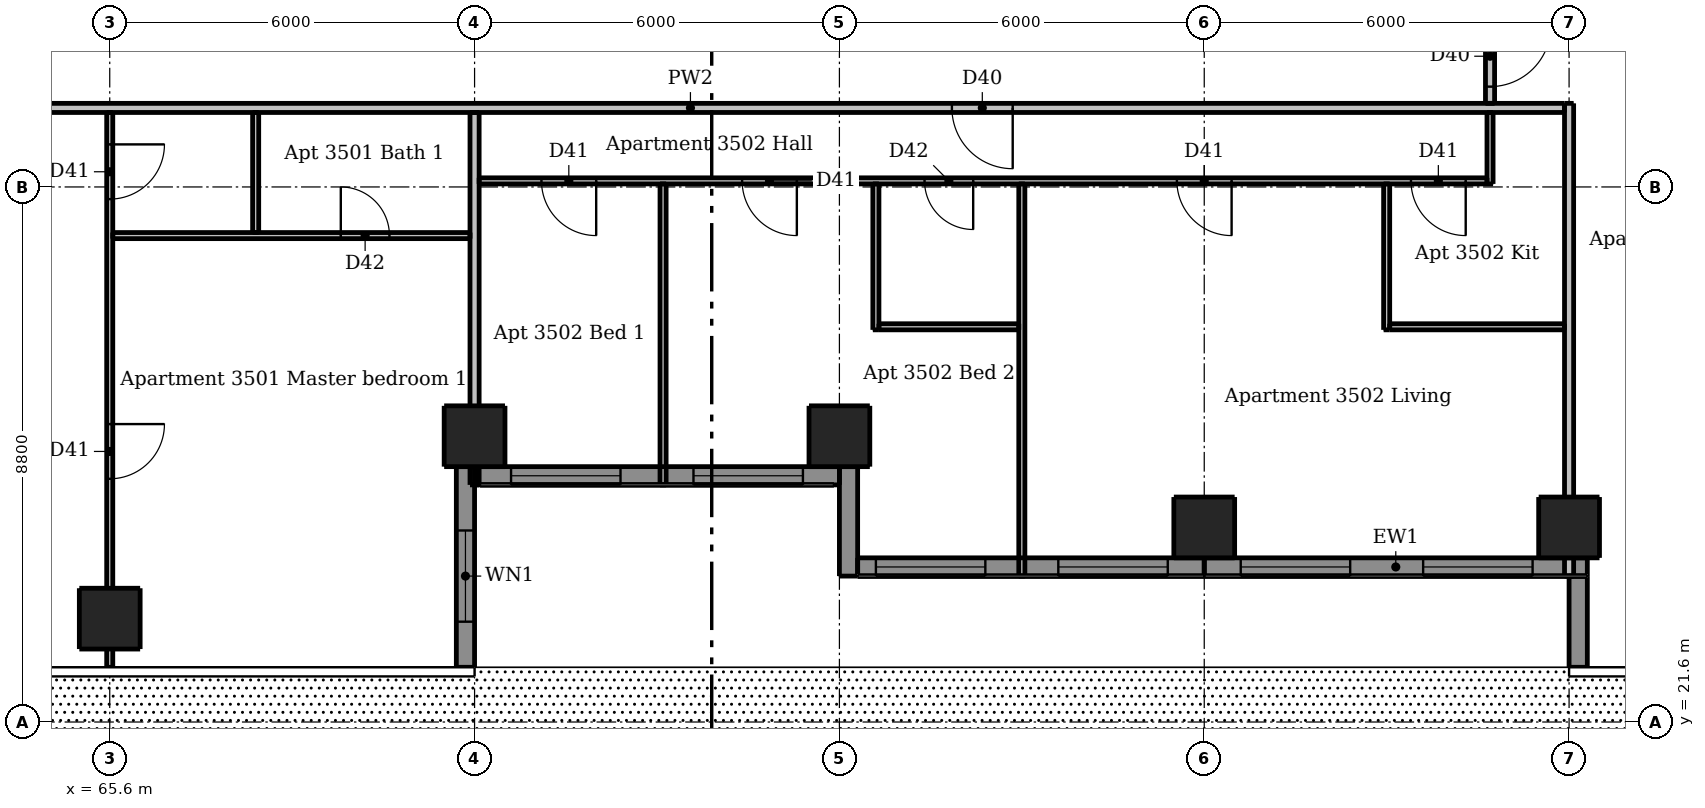
"""IFC4 building model, lengths in metres.
Left out: names, types, materials, properties, quantities, classifications, styles, units other than length and angle.
Written with IfcOpenShell. Run it as: python <this file> out.ifc"""

import sys

from ifc_helpers import new_model, si_unit, direction, frame, frame_2d, origin, origin_2d, place, context, subcontext, project, spatial, rectangle, extrude, element, fill, save


model = new_model("IFC4")
c1 = context("Model", 3, precision=1e-05, world=origin(), true_north=direction((0.0, 1.0)))
c2 = subcontext(c1, "Body", "Model", "MODEL_VIEW")
j1 = project(units=[si_unit("LENGTHUNIT", "METRE"), si_unit("PLANEANGLEUNIT", "RADIAN")], contexts=[c1])
p1 = place(None, origin())
s1 = spatial("IfcSite", under=j1, at=p1, CompositionType="ELEMENT")
p2 = place(p1, origin())
s2 = spatial("IfcBuilding", under=s1, at=p2, CompositionType="ELEMENT")
p3 = place(p2, frame((0.0, 0.0, 133.9)))
s3 = spatial("IfcBuildingStorey", under=s2, at=p3, CompositionType="ELEMENT", Elevation=133.9)
for number, where, z_axis, x_axis in (
    (1, (65.6, 23.3, 0.0), (0.0, 0.0, 1.0), (1.0, 0.0, 0.0)),
    (2, (71.6, 26.3, 0.0), (0.0, 0.0, 1.0), (1.0, 0.0, 0.0)),
    (3, (77.6, 26.3, 0.0), (0.0, 0.0, 1.0), (1.0, 0.0, 0.0)),
    (4, (83.6, 24.8, 0.0), (0.0, 0.0, 1.0), (1.0, 0.0, 0.0)),
    (5, (89.6, 24.8, 0.0), (0.0, 0.0, 1.0), (1.0, 0.0, 0.0)),
):
    element("IfcColumn", number, at=place(p3, frame(where, z_axis=z_axis, x_axis=x_axis)), inside=s3, PredefinedType="COLUMN", context=c2, shape_type="SweptSolid", body=[
        extrude(rectangle(XDim=1.0, YDim=1.0, at=origin_2d()), origin(), (0.0, 0.0, 1.0), 3.05),
    ])
p4 = place(p3, frame((71.45, 22.5, 0.0), z_axis=(0.0, 0.0, 1.0), x_axis=(0.0, 1.0, 0.0)))
e6 = element("IfcWall", 6, at=p4, inside=s3, PredefinedType="SOLIDWALL", context=c2, shape_type="SweptSolid", body=[
    extrude(rectangle(XDim=3.3, YDim=0.3, at=frame_2d((1.65, 0.0))), origin(), (0.0, 0.0, 1.0), 3.05),
])
p5 = place(p4, frame((0.75, 0.0, 0.9)))
e7 = element("IfcOpeningElement", 7, at=p5, cuts=e6, PredefinedType="OPENING", context=c2, shape_type="SweptSolid", body=[
    extrude(rectangle(XDim=1.5, YDim=1.5, at=frame_2d((0.75, 0.75))), frame((0.0, 0.16, 0.0), z_axis=(0.0, -1.0, 0.0), x_axis=(1.0, 0.0, 0.0)), (0.0, 0.0, 1.0), 0.32),
])
p6 = place(p3, frame((77.75, 25.8, 0.0), z_axis=(0.0, 0.0, 1.0), x_axis=(0.0, -1.0, 0.0)))
e8 = element("IfcWall", 8, at=p6, inside=s3, PredefinedType="SOLIDWALL", context=c2, shape_type="SweptSolid", body=[
    extrude(rectangle(XDim=1.8, YDim=0.3, at=frame_2d((0.9, 0.0))), origin(), (0.0, 0.0, 1.0), 3.05),
])
p7 = place(p3, frame((89.75, 24.0, 0.0), z_axis=(0.0, 0.0, 1.0), x_axis=(0.0, -1.0, 0.0)))
e9 = element("IfcWall", 9, at=p7, inside=s3, PredefinedType="SOLIDWALL", context=c2, shape_type="SweptSolid", body=[
    extrude(rectangle(XDim=1.5, YDim=0.3, at=frame_2d((0.75, 0.0))), origin(), (0.0, 0.0, 1.0), 3.05),
])
p8 = place(p3, frame((71.6, 25.65, 0.0), z_axis=(0.0, 0.0, 1.0), x_axis=(1.0, 0.0, 0.0)))
e10 = element("IfcWall", 10, at=p8, inside=s3, PredefinedType="SOLIDWALL", context=c2, shape_type="SweptSolid", body=[
    extrude(rectangle(XDim=6.0, YDim=0.3, at=frame_2d((3.0, 0.0))), origin(), (0.0, 0.0, 1.0), 3.05),
])
p9 = place(p8, frame((0.6, 0.0, 0.15)))
e11 = element("IfcOpeningElement", 11, at=p9, cuts=e10, PredefinedType="OPENING", context=c2, shape_type="SweptSolid", body=[
    extrude(rectangle(XDim=1.8, YDim=2.1, at=frame_2d((0.9, 1.05))), frame((0.0, 0.16, 0.0), z_axis=(0.0, -1.0, 0.0), x_axis=(1.0, 0.0, 0.0)), (0.0, 0.0, 1.0), 0.32),
])
p10 = place(p8, frame((3.6, 0.0, 0.15)))
e12 = element("IfcOpeningElement", 12, at=p10, cuts=e10, PredefinedType="OPENING", context=c2, shape_type="SweptSolid", body=[
    extrude(rectangle(XDim=1.8, YDim=2.1, at=frame_2d((0.9, 1.05))), frame((0.0, 0.16, 0.0), z_axis=(0.0, -1.0, 0.0), x_axis=(1.0, 0.0, 0.0)), (0.0, 0.0, 1.0), 0.32),
])
p11 = place(p3, frame((77.9, 24.15, 0.0), z_axis=(0.0, 0.0, 1.0), x_axis=(1.0, 0.0, 0.0)))
e13 = element("IfcWall", 13, at=p11, inside=s3, PredefinedType="SOLIDWALL", context=c2, shape_type="SweptSolid", body=[
    extrude(rectangle(XDim=5.7, YDim=0.3, at=frame_2d((2.85, 0.0))), origin(), (0.0, 0.0, 1.0), 3.05),
])
p12 = place(p11, frame((0.3, 0.0, 0.15)))
e14 = element("IfcOpeningElement", 14, at=p12, cuts=e13, PredefinedType="OPENING", context=c2, shape_type="SweptSolid", body=[
    extrude(rectangle(XDim=1.8, YDim=2.1, at=frame_2d((0.9, 1.05))), frame((0.0, 0.16, 0.0), z_axis=(0.0, -1.0, 0.0), x_axis=(1.0, 0.0, 0.0)), (0.0, 0.0, 1.0), 0.32),
])
p13 = place(p11, frame((3.3, 0.0, 0.15)))
e15 = element("IfcOpeningElement", 15, at=p13, cuts=e13, PredefinedType="OPENING", context=c2, shape_type="SweptSolid", body=[
    extrude(rectangle(XDim=1.8, YDim=2.1, at=frame_2d((0.9, 1.05))), frame((0.0, 0.16, 0.0), z_axis=(0.0, -1.0, 0.0), x_axis=(1.0, 0.0, 0.0)), (0.0, 0.0, 1.0), 0.32),
])
p14 = place(p3, frame((83.6, 24.15, 0.0), z_axis=(0.0, 0.0, 1.0), x_axis=(1.0, 0.0, 0.0)))
e16 = element("IfcWall", 16, at=p14, inside=s3, PredefinedType="SOLIDWALL", context=c2, shape_type="SweptSolid", body=[
    extrude(rectangle(XDim=6.3, YDim=0.3, at=frame_2d((3.15, 0.0))), origin(), (0.0, 0.0, 1.0), 3.05),
])
p15 = place(p14, frame((0.6, 0.0, 0.15)))
e17 = element("IfcOpeningElement", 17, at=p15, cuts=e16, PredefinedType="OPENING", context=c2, shape_type="SweptSolid", body=[
    extrude(rectangle(XDim=1.8, YDim=2.1, at=frame_2d((0.9, 1.05))), frame((0.0, 0.16, 0.0), z_axis=(0.0, -1.0, 0.0), x_axis=(1.0, 0.0, 0.0)), (0.0, 0.0, 1.0), 0.32),
])
p16 = place(p14, frame((3.6, 0.0, 0.15)))
e18 = element("IfcOpeningElement", 18, at=p16, cuts=e16, PredefinedType="OPENING", context=c2, shape_type="SweptSolid", body=[
    extrude(rectangle(XDim=1.8, YDim=2.1, at=frame_2d((0.9, 1.05))), frame((0.0, 0.16, 0.0), z_axis=(0.0, -1.0, 0.0), x_axis=(1.0, 0.0, 0.0)), (0.0, 0.0, 1.0), 0.32),
])
p17 = place(p3, frame((65.6, 31.625, 0.0), z_axis=(0.0, 0.0, 1.0), x_axis=(0.0, -1.0, 0.0)))
e19 = element("IfcWall", 19, at=p17, inside=s3, PredefinedType="PARTITIONING", context=c2, shape_type="SweptSolid", body=[
    extrude(rectangle(XDim=9.125, YDim=0.1, at=frame_2d((4.562, 0.0))), origin(), (0.0, 0.0, 1.0), 2.516),
])
p18 = place(p17, frame((0.525, 0.0, 0.0)))
e20 = element("IfcOpeningElement", 20, at=p18, cuts=e19, PredefinedType="OPENING", context=c2, shape_type="SweptSolid", body=[
    extrude(rectangle(XDim=0.9, YDim=2.1, at=frame_2d((0.45, 1.05))), frame((0.0, 0.06, 0.0), z_axis=(0.0, -1.0, 0.0), x_axis=(1.0, 0.0, 0.0)), (0.0, 0.0, 1.0), 0.12),
])
p19 = place(p17, frame((5.125, 0.0, 0.0)))
e21 = element("IfcOpeningElement", 21, at=p19, cuts=e19, PredefinedType="OPENING", context=c2, shape_type="SweptSolid", body=[
    extrude(rectangle(XDim=0.9, YDim=2.1, at=frame_2d((0.45, 1.05))), frame((0.0, 0.06, 0.0), z_axis=(0.0, -1.0, 0.0), x_axis=(1.0, 0.0, 0.0)), (0.0, 0.0, 1.0), 0.12),
])
p20 = place(p3, frame((68.0, 29.65, 0.0), z_axis=(0.0, 0.0, 1.0), x_axis=(0.0, 1.0, 0.0)))
e22 = element("IfcWall", 22, at=p20, inside=s3, PredefinedType="PARTITIONING", context=c2, shape_type="SweptSolid", body=[
    extrude(rectangle(XDim=1.975, YDim=0.1, at=frame_2d((0.988, 0.0))), origin(), (0.0, 0.0, 1.0), 3.05),
])
p21 = place(p3, frame((74.7, 25.5, 0.0), z_axis=(0.0, 0.0, 1.0), x_axis=(0.0, 1.0, 0.0)))
e23 = element("IfcWall", 23, at=p21, inside=s3, PredefinedType="PARTITIONING", context=c2, shape_type="SweptSolid", body=[
    extrude(rectangle(XDim=4.95, YDim=0.1, at=frame_2d((2.475, 0.0))), origin(), (0.0, 0.0, 1.0), 3.05),
])
p22 = place(p3, frame((78.2, 28.05, 0.0), z_axis=(0.0, 0.0, 1.0), x_axis=(0.0, 1.0, 0.0)))
e24 = element("IfcWall", 24, at=p22, inside=s3, PredefinedType="PARTITIONING", context=c2, shape_type="SweptSolid", body=[
    extrude(rectangle(XDim=2.4, YDim=0.1, at=frame_2d((1.2, 0.0))), origin(), (0.0, 0.0, 1.0), 3.05),
])
p23 = place(p3, frame((80.6, 24.0, 0.0), z_axis=(0.0, 0.0, 1.0), x_axis=(0.0, 1.0, 0.0)))
e25 = element("IfcWall", 25, at=p23, inside=s3, PredefinedType="PARTITIONING", context=c2, shape_type="SweptSolid", body=[
    extrude(rectangle(XDim=6.45, YDim=0.1, at=frame_2d((3.225, 0.0))), origin(), (0.0, 0.0, 1.0), 3.05),
])
p24 = place(p3, frame((86.6, 28.05, 0.0), z_axis=(0.0, 0.0, 1.0), x_axis=(0.0, 1.0, 0.0)))
e26 = element("IfcWall", 26, at=p24, inside=s3, PredefinedType="PARTITIONING", context=c2, shape_type="SweptSolid", body=[
    extrude(rectangle(XDim=2.4, YDim=0.1, at=frame_2d((1.2, 0.0))), origin(), (0.0, 0.0, 1.0), 3.05),
])
p25 = place(p3, frame((88.3, 30.45, 0.0), z_axis=(0.0, 0.0, 1.0), x_axis=(0.0, 1.0, 0.0)))
e27 = element("IfcWall", 27, at=p25, inside=s3, PredefinedType="PARTITIONING", context=c2, shape_type="SweptSolid", body=[
    extrude(rectangle(XDim=1.175, YDim=0.1, at=frame_2d((0.587, 0.0))), origin(), (0.0, 0.0, 1.0), 3.05),
])
p26 = place(p3, frame((88.25, 30.5, 0.0), z_axis=(0.0, 0.0, 1.0), x_axis=(-1.0, 0.0, 0.0)))
e28 = element("IfcWall", 28, at=p26, inside=s3, PredefinedType="PARTITIONING", context=c2, shape_type="SweptSolid", body=[
    extrude(rectangle(XDim=16.575, YDim=0.1, at=frame_2d((8.288, 0.0))), origin(), (0.0, 0.0, 1.0), 3.05),
])
p27 = place(p26, frame((4.2, 0.0, 0.0)))
e29 = element("IfcOpeningElement", 29, at=p27, cuts=e28, PredefinedType="OPENING", context=c2, shape_type="SweptSolid", body=[
    extrude(rectangle(XDim=0.9, YDim=2.1, at=frame_2d((0.45, 1.05))), frame((0.0, 0.06, 0.0), z_axis=(0.0, -1.0, 0.0), x_axis=(1.0, 0.0, 0.0)), (0.0, 0.0, 1.0), 0.12),
])
p28 = place(p26, frame((0.35, 0.0, 0.0)))
e30 = element("IfcOpeningElement", 30, at=p28, cuts=e28, PredefinedType="OPENING", context=c2, shape_type="SweptSolid", body=[
    extrude(rectangle(XDim=0.9, YDim=2.1, at=frame_2d((0.45, 1.05))), frame((0.0, 0.06, 0.0), z_axis=(0.0, -1.0, 0.0), x_axis=(1.0, 0.0, 0.0)), (0.0, 0.0, 1.0), 0.12),
])
p29 = place(p26, frame((14.65, 0.0, 0.0)))
e31 = element("IfcOpeningElement", 31, at=p29, cuts=e28, PredefinedType="OPENING", context=c2, shape_type="SweptSolid", body=[
    extrude(rectangle(XDim=0.9, YDim=2.1, at=frame_2d((0.45, 1.05))), frame((0.0, 0.06, 0.0), z_axis=(0.0, -1.0, 0.0), x_axis=(1.0, 0.0, 0.0)), (0.0, 0.0, 1.0), 0.12),
])
p30 = place(p26, frame((11.35, 0.0, 0.0)))
e32 = element("IfcOpeningElement", 32, at=p30, cuts=e28, PredefinedType="OPENING", context=c2, shape_type="SweptSolid", body=[
    extrude(rectangle(XDim=0.9, YDim=2.1, at=frame_2d((0.45, 1.05))), frame((0.0, 0.06, 0.0), z_axis=(0.0, -1.0, 0.0), x_axis=(1.0, 0.0, 0.0)), (0.0, 0.0, 1.0), 0.12),
])
p31 = place(p26, frame((8.45, 0.0, 0.0)))
e33 = element("IfcOpeningElement", 33, at=p31, cuts=e28, PredefinedType="OPENING", context=c2, shape_type="SweptSolid", body=[
    extrude(rectangle(XDim=0.8, YDim=2.1, at=frame_2d((0.4, 1.05))), frame((0.0, 0.06, 0.0), z_axis=(0.0, -1.0, 0.0), x_axis=(1.0, 0.0, 0.0)), (0.0, 0.0, 1.0), 0.12),
])
p32 = place(p3, frame((65.65, 29.6, 0.0), z_axis=(0.0, 0.0, 1.0), x_axis=(1.0, 0.0, 0.0)))
e34 = element("IfcWall", 34, at=p32, inside=s3, PredefinedType="PARTITIONING", context=c2, shape_type="SweptSolid", body=[
    extrude(rectangle(XDim=5.875, YDim=0.1, at=frame_2d((2.938, 0.0))), origin(), (0.0, 0.0, 1.0), 3.05),
])
p33 = place(p32, frame((3.75, 0.0, 0.0)))
e35 = element("IfcOpeningElement", 35, at=p33, cuts=e34, PredefinedType="OPENING", context=c2, shape_type="SweptSolid", body=[
    extrude(rectangle(XDim=0.8, YDim=2.1, at=frame_2d((0.4, 1.05))), frame((0.0, 0.06, 0.0), z_axis=(0.0, -1.0, 0.0), x_axis=(1.0, 0.0, 0.0)), (0.0, 0.0, 1.0), 0.12),
])
p34 = place(p3, frame((78.25, 28.1, 0.0), z_axis=(0.0, 0.0, 1.0), x_axis=(1.0, 0.0, 0.0)))
e36 = element("IfcWall", 36, at=p34, inside=s3, PredefinedType="PARTITIONING", context=c2, shape_type="SweptSolid", body=[
    extrude(rectangle(XDim=2.3, YDim=0.1, at=frame_2d((1.15, 0.0))), origin(), (0.0, 0.0, 1.0), 3.05),
])
p35 = place(p3, frame((86.65, 28.1, 0.0), z_axis=(0.0, 0.0, 1.0), x_axis=(1.0, 0.0, 0.0)))
e37 = element("IfcWall", 37, at=p35, inside=s3, PredefinedType="PARTITIONING", context=c2, shape_type="SweptSolid", body=[
    extrude(rectangle(XDim=2.875, YDim=0.1, at=frame_2d((1.438, 0.0))), origin(), (0.0, 0.0, 1.0), 3.05),
])
p36 = place(p3, frame((71.6, 25.5, 0.0), z_axis=(0.0, 0.0, 1.0), x_axis=(0.0, 1.0, 0.0)))
e38 = element("IfcWall", 38, at=p36, inside=s3, PredefinedType="PARTITIONING", context=c2, shape_type="SweptSolid", body=[
    extrude(rectangle(XDim=6.125, YDim=0.15, at=frame_2d((3.062, 0.0))), origin(), (0.0, 0.0, 1.0), 2.59),
])
p37 = place(p3, frame((88.3, 60.475, 0.0), z_axis=(0.0, 0.0, 1.0), x_axis=(0.0, -1.0, 0.0)))
e39 = element("IfcWall", 39, at=p37, inside=s3, PredefinedType="PARTITIONING", context=c2, shape_type="SweptSolid", body=[
    extrude(rectangle(XDim=28.7, YDim=0.15, at=frame_2d((14.35, 0.0))), origin(), (0.0, 0.0, 1.0), 3.05),
])
p38 = place(p37, frame((27.425, 0.0, 0.0)))
e40 = element("IfcOpeningElement", 40, at=p38, cuts=e39, PredefinedType="OPENING", context=c2, shape_type="SweptSolid", body=[
    extrude(rectangle(XDim=1.0, YDim=2.1, at=frame_2d((0.5, 1.05))), frame((0.0, 0.085, 0.0), z_axis=(0.0, -1.0, 0.0), x_axis=(1.0, 0.0, 0.0)), (0.0, 0.0, 1.0), 0.17),
])
p39 = place(p37, frame((10.575, 0.0, 0.0)))
e41 = element("IfcOpeningElement", 41, at=p39, cuts=e39, PredefinedType="OPENING", context=c2, shape_type="SweptSolid", body=[
    extrude(rectangle(XDim=1.0, YDim=2.1, at=frame_2d((0.5, 1.05))), frame((0.0, 0.085, 0.0), z_axis=(0.0, -1.0, 0.0), x_axis=(1.0, 0.0, 0.0)), (0.0, 0.0, 1.0), 0.17),
])
p40 = place(p3, frame((89.6, 24.0, 0.0), z_axis=(0.0, 0.0, 1.0), x_axis=(0.0, 1.0, 0.0)))
e42 = element("IfcWall", 42, at=p40, inside=s3, PredefinedType="PARTITIONING", context=c2, shape_type="SweptSolid", body=[
    extrude(rectangle(XDim=7.775, YDim=0.15, at=frame_2d((3.887, 0.0))), origin(), (0.0, 0.0, 1.0), 2.51),
])
p41 = place(p3, frame((89.525, 31.7, 0.0), z_axis=(0.0, 0.0, 1.0), x_axis=(-1.0, 0.0, 0.0)))
e43 = element("IfcWall", 43, at=p41, inside=s3, PredefinedType="PARTITIONING", context=c2, shape_type="SweptSolid", body=[
    extrude(rectangle(XDim=28.75, YDim=0.15, at=frame_2d((14.375, 0.0))), origin(), (0.0, 0.0, 1.0), 3.05),
])
p42 = place(p41, frame((25.875, 0.0, 0.0)))
e44 = element("IfcOpeningElement", 44, at=p42, cuts=e43, PredefinedType="OPENING", context=c2, shape_type="SweptSolid", body=[
    extrude(rectangle(XDim=1.0, YDim=2.1, at=frame_2d((0.5, 1.05))), frame((0.0, 0.085, 0.0), z_axis=(0.0, -1.0, 0.0), x_axis=(1.0, 0.0, 0.0)), (0.0, 0.0, 1.0), 0.17),
])
p43 = place(p41, frame((9.075, 0.0, 0.0)))
e45 = element("IfcOpeningElement", 45, at=p43, cuts=e43, PredefinedType="OPENING", context=c2, shape_type="SweptSolid", body=[
    extrude(rectangle(XDim=1.0, YDim=2.1, at=frame_2d((0.5, 1.05))), frame((0.0, 0.085, 0.0), z_axis=(0.0, -1.0, 0.0), x_axis=(1.0, 0.0, 0.0)), (0.0, 0.0, 1.0), 0.17),
])
p44 = place(p5, origin())
e46 = element("IfcWindow", 46, at=p44, inside=s3, PartitioningType="DOUBLE_PANEL_VERTICAL", PredefinedType="WINDOW", context=c2, shape_type="SweptSolid", body=[
    extrude(rectangle(XDim=1.5, YDim=1.5, at=frame_2d((0.75, 0.75))), frame((0.0, 0.03, 0.0), z_axis=(0.0, -1.0, 0.0), x_axis=(1.0, 0.0, 0.0)), (0.0, 0.0, 1.0), 0.06),
])
fill(e7, e46)
p45 = place(p9, origin())
e47 = element("IfcWindow", 47, at=p45, inside=s3, PartitioningType="DOUBLE_PANEL_VERTICAL", PredefinedType="WINDOW", context=c2, shape_type="SweptSolid", body=[
    extrude(rectangle(XDim=1.8, YDim=2.1, at=frame_2d((0.9, 1.05))), frame((0.0, 0.03, 0.0), z_axis=(0.0, -1.0, 0.0), x_axis=(1.0, 0.0, 0.0)), (0.0, 0.0, 1.0), 0.06),
])
fill(e11, e47)
p46 = place(p10, origin())
e48 = element("IfcWindow", 48, at=p46, inside=s3, PartitioningType="DOUBLE_PANEL_VERTICAL", PredefinedType="WINDOW", context=c2, shape_type="SweptSolid", body=[
    extrude(rectangle(XDim=1.8, YDim=2.1, at=frame_2d((0.9, 1.05))), frame((0.0, 0.03, 0.0), z_axis=(0.0, -1.0, 0.0), x_axis=(1.0, 0.0, 0.0)), (0.0, 0.0, 1.0), 0.06),
])
fill(e12, e48)
p47 = place(p12, origin())
e49 = element("IfcWindow", 49, at=p47, inside=s3, PartitioningType="DOUBLE_PANEL_VERTICAL", PredefinedType="WINDOW", context=c2, shape_type="SweptSolid", body=[
    extrude(rectangle(XDim=1.8, YDim=2.1, at=frame_2d((0.9, 1.05))), frame((0.0, 0.03, 0.0), z_axis=(0.0, -1.0, 0.0), x_axis=(1.0, 0.0, 0.0)), (0.0, 0.0, 1.0), 0.06),
])
fill(e14, e49)
p48 = place(p13, origin())
e50 = element("IfcWindow", 50, at=p48, inside=s3, PartitioningType="DOUBLE_PANEL_VERTICAL", PredefinedType="WINDOW", context=c2, shape_type="SweptSolid", body=[
    extrude(rectangle(XDim=1.8, YDim=2.1, at=frame_2d((0.9, 1.05))), frame((0.0, 0.03, 0.0), z_axis=(0.0, -1.0, 0.0), x_axis=(1.0, 0.0, 0.0)), (0.0, 0.0, 1.0), 0.06),
])
fill(e15, e50)
p49 = place(p15, origin())
e51 = element("IfcWindow", 51, at=p49, inside=s3, PartitioningType="DOUBLE_PANEL_VERTICAL", PredefinedType="WINDOW", context=c2, shape_type="SweptSolid", body=[
    extrude(rectangle(XDim=1.8, YDim=2.1, at=frame_2d((0.9, 1.05))), frame((0.0, 0.03, 0.0), z_axis=(0.0, -1.0, 0.0), x_axis=(1.0, 0.0, 0.0)), (0.0, 0.0, 1.0), 0.06),
])
fill(e17, e51)
p50 = place(p16, origin())
e52 = element("IfcWindow", 52, at=p50, inside=s3, PartitioningType="DOUBLE_PANEL_VERTICAL", PredefinedType="WINDOW", context=c2, shape_type="SweptSolid", body=[
    extrude(rectangle(XDim=1.8, YDim=2.1, at=frame_2d((0.9, 1.05))), frame((0.0, 0.03, 0.0), z_axis=(0.0, -1.0, 0.0), x_axis=(1.0, 0.0, 0.0)), (0.0, 0.0, 1.0), 0.06),
])
fill(e18, e52)
p51 = place(p18, origin())
e53 = element("IfcDoor", 53, at=p51, inside=s3, OperationType="SINGLE_SWING_LEFT", PredefinedType="DOOR", context=c2, shape_type="SweptSolid", body=[
    extrude(rectangle(XDim=0.9, YDim=2.1, at=frame_2d((0.45, 1.05))), frame((0.0, 0.025, 0.0), z_axis=(0.0, -1.0, 0.0), x_axis=(1.0, 0.0, 0.0)), (0.0, 0.0, 1.0), 0.05),
])
fill(e20, e53)
p52 = place(p19, origin())
e54 = element("IfcDoor", 54, at=p52, inside=s3, OperationType="SINGLE_SWING_LEFT", PredefinedType="DOOR", context=c2, shape_type="SweptSolid", body=[
    extrude(rectangle(XDim=0.9, YDim=2.1, at=frame_2d((0.45, 1.05))), frame((0.0, 0.025, 0.0), z_axis=(0.0, -1.0, 0.0), x_axis=(1.0, 0.0, 0.0)), (0.0, 0.0, 1.0), 0.05),
])
fill(e21, e54)
p53 = place(p33, origin())
e55 = element("IfcDoor", 55, at=p53, inside=s3, OperationType="SINGLE_SWING_LEFT", PredefinedType="DOOR", context=c2, shape_type="SweptSolid", body=[
    extrude(rectangle(XDim=0.8, YDim=2.1, at=frame_2d((0.4, 1.05))), frame((0.0, 0.025, 0.0), z_axis=(0.0, -1.0, 0.0), x_axis=(1.0, 0.0, 0.0)), (0.0, 0.0, 1.0), 0.05),
])
fill(e35, e55)
p54 = place(p43, origin())
e56 = element("IfcDoor", 56, at=p54, inside=s3, OperationType="SINGLE_SWING_LEFT", PredefinedType="DOOR", context=c2, shape_type="SweptSolid", body=[
    extrude(rectangle(XDim=1.0, YDim=2.1, at=frame_2d((0.5, 1.05))), frame((0.0, 0.025, 0.0), z_axis=(0.0, -1.0, 0.0), x_axis=(1.0, 0.0, 0.0)), (0.0, 0.0, 1.0), 0.05),
])
fill(e45, e56)
p55 = place(p27, origin())
e57 = element("IfcDoor", 57, at=p55, inside=s3, OperationType="SINGLE_SWING_LEFT", PredefinedType="DOOR", context=c2, shape_type="SweptSolid", body=[
    extrude(rectangle(XDim=0.9, YDim=2.1, at=frame_2d((0.45, 1.05))), frame((0.0, 0.025, 0.0), z_axis=(0.0, -1.0, 0.0), x_axis=(1.0, 0.0, 0.0)), (0.0, 0.0, 1.0), 0.05),
])
fill(e29, e57)
p56 = place(p28, origin())
e58 = element("IfcDoor", 58, at=p56, inside=s3, OperationType="SINGLE_SWING_LEFT", PredefinedType="DOOR", context=c2, shape_type="SweptSolid", body=[
    extrude(rectangle(XDim=0.9, YDim=2.1, at=frame_2d((0.45, 1.05))), frame((0.0, 0.025, 0.0), z_axis=(0.0, -1.0, 0.0), x_axis=(1.0, 0.0, 0.0)), (0.0, 0.0, 1.0), 0.05),
])
fill(e30, e58)
p57 = place(p29, origin())
e59 = element("IfcDoor", 59, at=p57, inside=s3, OperationType="SINGLE_SWING_LEFT", PredefinedType="DOOR", context=c2, shape_type="SweptSolid", body=[
    extrude(rectangle(XDim=0.9, YDim=2.1, at=frame_2d((0.45, 1.05))), frame((0.0, 0.025, 0.0), z_axis=(0.0, -1.0, 0.0), x_axis=(1.0, 0.0, 0.0)), (0.0, 0.0, 1.0), 0.05),
])
fill(e31, e59)
p58 = place(p30, origin())
e60 = element("IfcDoor", 60, at=p58, inside=s3, OperationType="SINGLE_SWING_LEFT", PredefinedType="DOOR", context=c2, shape_type="SweptSolid", body=[
    extrude(rectangle(XDim=0.9, YDim=2.1, at=frame_2d((0.45, 1.05))), frame((0.0, 0.025, 0.0), z_axis=(0.0, -1.0, 0.0), x_axis=(1.0, 0.0, 0.0)), (0.0, 0.0, 1.0), 0.05),
])
fill(e32, e60)
p59 = place(p31, origin())
e61 = element("IfcDoor", 61, at=p59, inside=s3, OperationType="SINGLE_SWING_LEFT", PredefinedType="DOOR", context=c2, shape_type="SweptSolid", body=[
    extrude(rectangle(XDim=0.8, YDim=2.1, at=frame_2d((0.4, 1.05))), frame((0.0, 0.025, 0.0), z_axis=(0.0, -1.0, 0.0), x_axis=(1.0, 0.0, 0.0)), (0.0, 0.0, 1.0), 0.05),
])
fill(e33, e61)
p60 = place(p38, origin())
e62 = element("IfcDoor", 62, at=p60, inside=s3, OperationType="SINGLE_SWING_LEFT", PredefinedType="DOOR", context=c2, shape_type="SweptSolid", body=[
    extrude(rectangle(XDim=1.0, YDim=2.1, at=frame_2d((0.5, 1.05))), frame((0.0, 0.025, 0.0), z_axis=(0.0, -1.0, 0.0), x_axis=(1.0, 0.0, 0.0)), (0.0, 0.0, 1.0), 0.05),
])
fill(e40, e62)
save(model, sys.argv[1])
